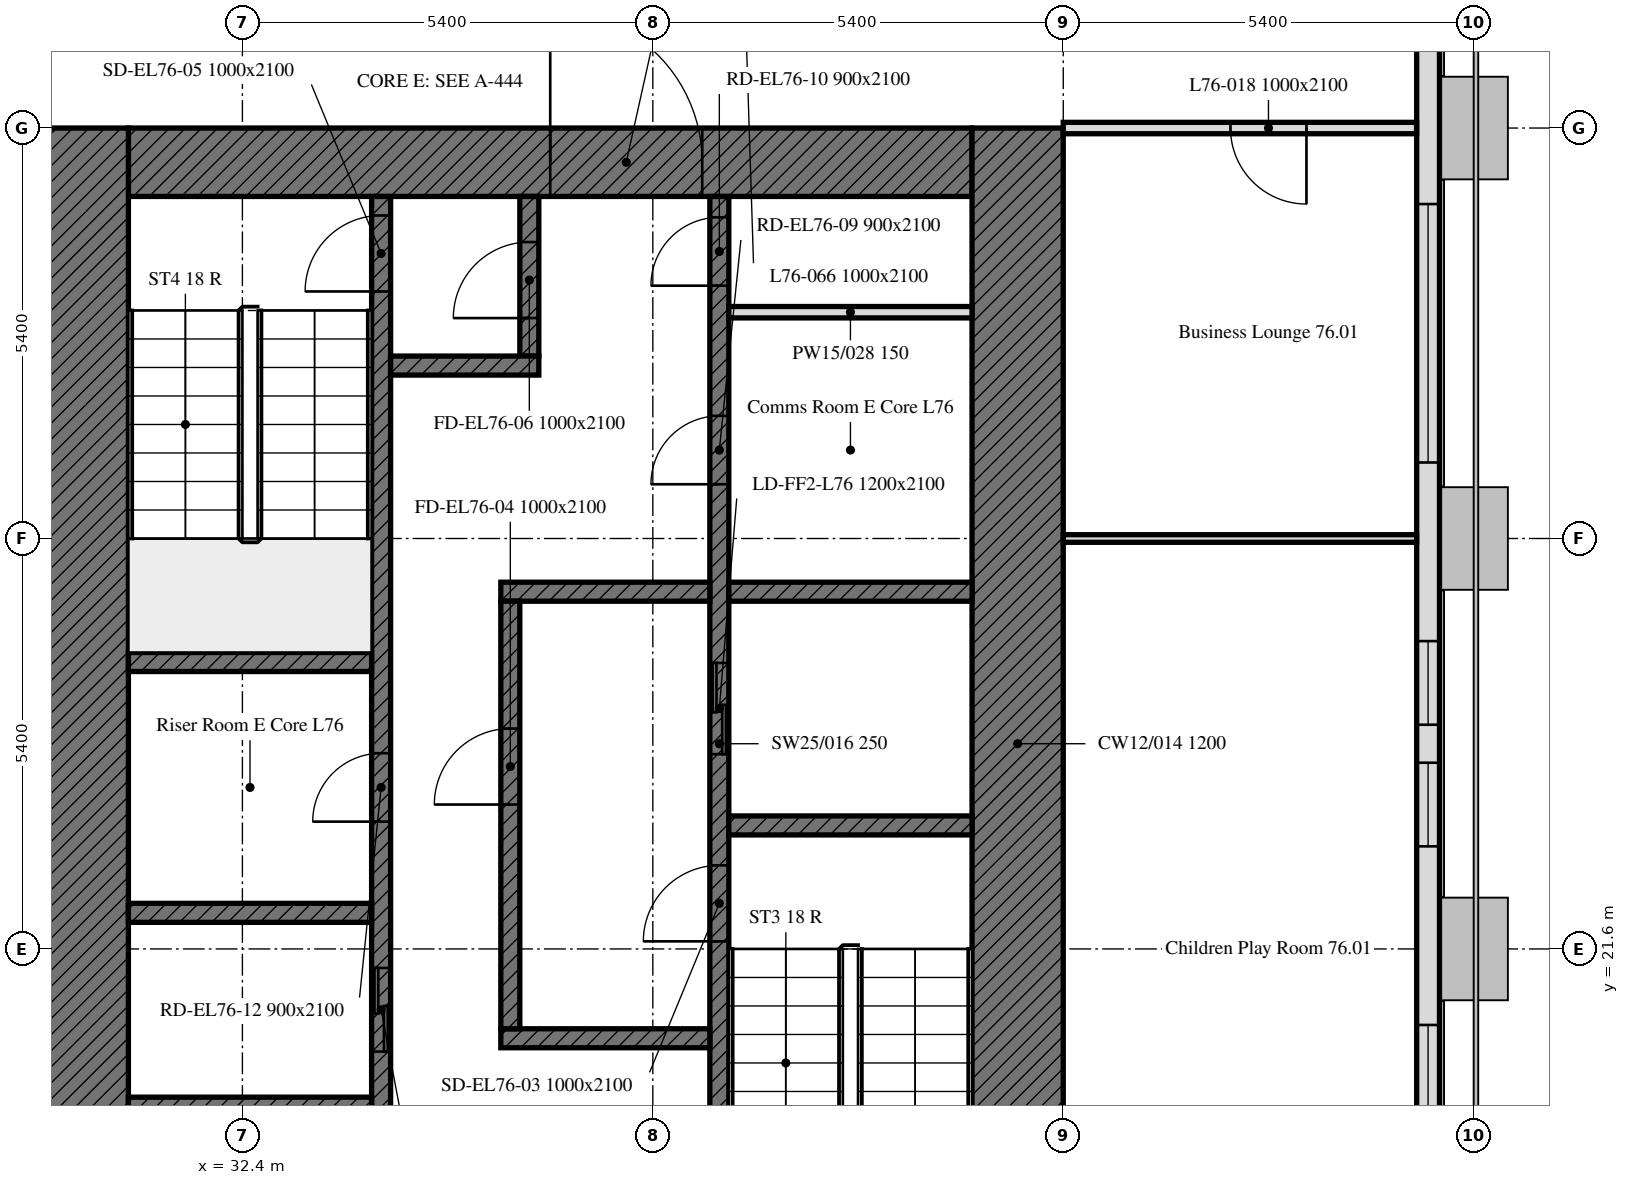
"""IFC4 building model, lengths in metres.
Left out: names, types, materials, properties, quantities, classifications, styles, units other than length and angle.
Written with IfcOpenShell. Run it as: python <this file> out.ifc"""

import sys

from ifc_helpers import new_model, si_unit, direction, frame, frame_2d, origin, place, context, subcontext, project, spatial, rectangle, extrude, element, fill, save


model = new_model("IFC4")
c1 = context("Model", 3, precision=1e-05, world=origin(), true_north=direction((0.0, 1.0)))
c2 = subcontext(c1, "Body", "Model", "MODEL_VIEW")
j1 = project(units=[si_unit("LENGTHUNIT", "METRE"), si_unit("PLANEANGLEUNIT", "RADIAN")], contexts=[c1])
p1 = place(None, origin())
s1 = spatial("IfcSite", under=j1, at=p1, CompositionType="ELEMENT")
p2 = place(p1, origin())
s2 = spatial("IfcBuilding", under=s1, at=p2, CompositionType="ELEMENT")
p3 = place(p2, frame((0.0, 0.0, 304.9)))
s3 = spatial("IfcBuildingStorey", under=s2, at=p3, CompositionType="ELEMENT", Elevation=304.9)
p4 = place(p3, frame((48.0, 10.986, 0.0), z_axis=(0.0, 0.0, 1.0), x_axis=(0.0, 1.0, 0.0)))
e1 = element("IfcWall", 1, at=p4, inside=s3, PredefinedType="SOLIDWALL", context=c2, shape_type="SweptSolid", body=[
    extrude(rectangle(XDim=32.027, YDim=0.3, at=frame_2d((16.014, 0.0))), origin(), (0.0, 0.0, 1.0), 2.8),
])
p5 = place(p4, frame((1.314, 0.0, 0.9)))
e2 = element("IfcOpeningElement", 2, at=p5, cuts=e1, PredefinedType="OPENING", context=c2, shape_type="SweptSolid", body=[
    extrude(rectangle(XDim=1.1, YDim=1.7, at=frame_2d((0.55, 0.85))), frame((0.0, 0.16, 0.0), z_axis=(0.0, -1.0, 0.0), x_axis=(1.0, 0.0, 0.0)), (0.0, 0.0, 1.0), 0.32),
])
p6 = place(p4, frame((2.589, 0.0, 0.9)))
e3 = element("IfcOpeningElement", 3, at=p6, cuts=e1, PredefinedType="OPENING", context=c2, shape_type="SweptSolid", body=[
    extrude(rectangle(XDim=0.65, YDim=1.7, at=frame_2d((0.325, 0.85))), frame((0.0, 0.16, 0.0), z_axis=(0.0, -1.0, 0.0), x_axis=(1.0, 0.0, 0.0)), (0.0, 0.0, 1.0), 0.32),
])
p7 = place(p4, frame((6.214, 0.0, 0.9)))
e4 = element("IfcOpeningElement", 4, at=p7, cuts=e1, PredefinedType="OPENING", context=c2, shape_type="SweptSolid", body=[
    extrude(rectangle(XDim=3.4, YDim=1.7, at=frame_2d((1.7, 0.85))), frame((0.0, 0.16, 0.0), z_axis=(0.0, -1.0, 0.0), x_axis=(1.0, 0.0, 0.0)), (0.0, 0.0, 1.0), 0.32),
])
p8 = place(p4, frame((11.964, 0.0, 0.9)))
e5 = element("IfcOpeningElement", 5, at=p8, cuts=e1, PredefinedType="OPENING", context=c2, shape_type="SweptSolid", body=[
    extrude(rectangle(XDim=1.1, YDim=1.7, at=frame_2d((0.55, 0.85))), frame((0.0, 0.16, 0.0), z_axis=(0.0, -1.0, 0.0), x_axis=(1.0, 0.0, 0.0)), (0.0, 0.0, 1.0), 0.32),
])
p9 = place(p4, frame((13.564, 0.0, 0.9)))
e6 = element("IfcOpeningElement", 6, at=p9, cuts=e1, PredefinedType="OPENING", context=c2, shape_type="SweptSolid", body=[
    extrude(rectangle(XDim=1.1, YDim=1.7, at=frame_2d((0.55, 0.85))), frame((0.0, 0.16, 0.0), z_axis=(0.0, -1.0, 0.0), x_axis=(1.0, 0.0, 0.0)), (0.0, 0.0, 1.0), 0.32),
])
p10 = place(p4, frame((17.014, 0.0, 0.9)))
e7 = element("IfcOpeningElement", 7, at=p10, cuts=e1, PredefinedType="OPENING", context=c2, shape_type="SweptSolid", body=[
    extrude(rectangle(XDim=3.4, YDim=1.7, at=frame_2d((1.7, 0.85))), frame((0.0, 0.16, 0.0), z_axis=(0.0, -1.0, 0.0), x_axis=(1.0, 0.0, 0.0)), (0.0, 0.0, 1.0), 0.32),
])
p11 = place(p4, frame((23.389, 0.0, 0.9)))
e8 = element("IfcOpeningElement", 8, at=p11, cuts=e1, PredefinedType="OPENING", context=c2, shape_type="SweptSolid", body=[
    extrude(rectangle(XDim=0.65, YDim=1.7, at=frame_2d((0.325, 0.85))), frame((0.0, 0.16, 0.0), z_axis=(0.0, -1.0, 0.0), x_axis=(1.0, 0.0, 0.0)), (0.0, 0.0, 1.0), 0.32),
])
p12 = place(p4, frame((24.364, 0.0, 0.9)))
e9 = element("IfcOpeningElement", 9, at=p12, cuts=e1, PredefinedType="OPENING", context=c2, shape_type="SweptSolid", body=[
    extrude(rectangle(XDim=1.1, YDim=1.7, at=frame_2d((0.55, 0.85))), frame((0.0, 0.16, 0.0), z_axis=(0.0, -1.0, 0.0), x_axis=(1.0, 0.0, 0.0)), (0.0, 0.0, 1.0), 0.32),
])
p13 = place(p4, frame((28.164, 0.0, 0.9)))
e10 = element("IfcOpeningElement", 10, at=p13, cuts=e1, PredefinedType="OPENING", context=c2, shape_type="SweptSolid", body=[
    extrude(rectangle(XDim=1.1, YDim=1.7, at=frame_2d((0.55, 0.85))), frame((0.0, 0.16, 0.0), z_axis=(0.0, -1.0, 0.0), x_axis=(1.0, 0.0, 0.0)), (0.0, 0.0, 1.0), 0.32),
])
p14 = place(p4, frame((29.764, 0.0, 0.9)))
e11 = element("IfcOpeningElement", 11, at=p14, cuts=e1, PredefinedType="OPENING", context=c2, shape_type="SweptSolid", body=[
    extrude(rectangle(XDim=1.1, YDim=1.7, at=frame_2d((0.55, 0.85))), frame((0.0, 0.16, 0.0), z_axis=(0.0, -1.0, 0.0), x_axis=(1.0, 0.0, 0.0)), (0.0, 0.0, 1.0), 0.32),
])
p15 = place(p3, frame((30.9, 31.95, 0.0), z_axis=(0.0, 0.0, 1.0), x_axis=(1.0, 0.0, 0.0)))
e12 = element("IfcWall", 12, at=p15, inside=s3, PredefinedType="SOLIDWALL", context=c2, shape_type="SweptSolid", body=[
    extrude(rectangle(XDim=11.1, YDim=0.9, at=frame_2d((5.55, 0.0))), origin(), (0.0, 0.0, 1.0), 2.8),
])
p16 = place(p15, frame((5.55, 0.0, 0.0)))
e13 = element("IfcOpeningElement", 13, at=p16, cuts=e12, PredefinedType="OPENING", context=c2, shape_type="SweptSolid", body=[
    extrude(rectangle(XDim=2.0, YDim=2.4, at=frame_2d((1.0, 1.2))), frame((0.0, 0.45, 0.0), z_axis=(0.0, -1.0, 0.0), x_axis=(1.0, 0.0, 0.0)), (0.0, 0.0, 1.0), 0.9),
])
for number, where, z_axis, x_axis in (
    (14, (42.6, 32.4, 0.0), (0.0, 0.0, 1.0), (0.0, -1.0, 0.0)),
    (15, (30.3, 16.2, 0.0), (0.0, 0.0, 1.0), (0.0, 1.0, 0.0)),
):
    element("IfcWall", number, at=place(p3, frame(where, z_axis=z_axis, x_axis=x_axis)), inside=s3, PredefinedType="SOLIDWALL", context=c2, shape_type="SweptSolid", body=[
        extrude(rectangle(XDim=16.2, YDim=1.2, at=frame_2d((8.1, 0.0))), origin(), (0.0, 0.0, 1.0), 2.8),
    ])
p17 = place(p3, frame((38.675, 17.1, 0.0), z_axis=(0.0, 0.0, 1.0), x_axis=(0.0, 1.0, 0.0)))
e16 = element("IfcWall", 16, at=p17, inside=s3, PredefinedType="SOLIDWALL", context=c2, shape_type="SweptSolid", body=[
    extrude(rectangle(XDim=14.4, YDim=0.25, at=frame_2d((7.2, 0.0))), origin(), (0.0, 0.0, 1.0), 2.8),
])
p18 = place(p17, frame((4.6, 0.0, 0.0)))
e17 = element("IfcOpeningElement", 17, at=p18, cuts=e16, PredefinedType="OPENING", context=c2, shape_type="SweptSolid", body=[
    extrude(rectangle(XDim=1.0, YDim=2.1, at=frame_2d((0.5, 1.05))), frame((0.0, 0.125, 0.0), z_axis=(0.0, -1.0, 0.0), x_axis=(1.0, 0.0, 0.0)), (0.0, 0.0, 1.0), 0.25),
])
p19 = place(p17, frame((7.062, 0.0, 0.0)))
e18 = element("IfcOpeningElement", 18, at=p19, cuts=e16, PredefinedType="OPENING", context=c2, shape_type="SweptSolid", body=[
    extrude(rectangle(XDim=1.2, YDim=2.1, at=frame_2d((0.6, 1.05))), frame((0.0, 0.125, 0.0), z_axis=(0.0, -1.0, 0.0), x_axis=(1.0, 0.0, 0.0)), (0.0, 0.0, 1.0), 0.25),
])
p20 = place(p17, frame((10.614, 0.0, 0.0)))
e19 = element("IfcOpeningElement", 19, at=p20, cuts=e16, PredefinedType="OPENING", context=c2, shape_type="SweptSolid", body=[
    extrude(rectangle(XDim=0.9, YDim=2.1, at=frame_2d((0.45, 1.05))), frame((0.0, 0.125, 0.0), z_axis=(0.0, -1.0, 0.0), x_axis=(1.0, 0.0, 0.0)), (0.0, 0.0, 1.0), 0.25),
])
p21 = place(p17, frame((13.226, 0.0, 0.0)))
e20 = element("IfcOpeningElement", 20, at=p21, cuts=e16, PredefinedType="OPENING", context=c2, shape_type="SweptSolid", body=[
    extrude(rectangle(XDim=0.9, YDim=2.1, at=frame_2d((0.45, 1.05))), frame((0.0, 0.125, 0.0), z_axis=(0.0, -1.0, 0.0), x_axis=(1.0, 0.0, 0.0)), (0.0, 0.0, 1.0), 0.25),
])
p22 = place(p3, frame((34.225, 17.1, 0.0), z_axis=(0.0, 0.0, 1.0), x_axis=(0.0, 1.0, 0.0)))
e21 = element("IfcWall", 21, at=p22, inside=s3, PredefinedType="SOLIDWALL", context=c2, shape_type="SweptSolid", body=[
    extrude(rectangle(XDim=14.4, YDim=0.25, at=frame_2d((7.2, 0.0))), origin(), (0.0, 0.0, 1.0), 2.8),
])
p23 = place(p22, frame((13.15, 0.0, 0.0)))
e22 = element("IfcOpeningElement", 22, at=p23, cuts=e21, PredefinedType="OPENING", context=c2, shape_type="SweptSolid", body=[
    extrude(rectangle(XDim=1.0, YDim=2.1, at=frame_2d((0.5, 1.05))), frame((0.0, 0.125, 0.0), z_axis=(0.0, -1.0, 0.0), x_axis=(1.0, 0.0, 0.0)), (0.0, 0.0, 1.0), 0.25),
])
p24 = place(p22, frame((3.15, 0.0, 0.0)))
e23 = element("IfcOpeningElement", 23, at=p24, cuts=e21, PredefinedType="OPENING", context=c2, shape_type="SweptSolid", body=[
    extrude(rectangle(XDim=1.1, YDim=2.1, at=frame_2d((0.55, 1.05))), frame((0.0, 0.125, 0.0), z_axis=(0.0, -1.0, 0.0), x_axis=(1.0, 0.0, 0.0)), (0.0, 0.0, 1.0), 0.25),
])
p25 = place(p22, frame((0.7, 0.0, 0.0)))
e24 = element("IfcOpeningElement", 24, at=p25, cuts=e21, PredefinedType="OPENING", context=c2, shape_type="SweptSolid", body=[
    extrude(rectangle(XDim=0.9, YDim=2.1, at=frame_2d((0.45, 1.05))), frame((0.0, 0.125, 0.0), z_axis=(0.0, -1.0, 0.0), x_axis=(1.0, 0.0, 0.0)), (0.0, 0.0, 1.0), 0.25),
])
p26 = place(p22, frame((6.175, 0.0, 0.0)))
e25 = element("IfcOpeningElement", 25, at=p26, cuts=e21, PredefinedType="OPENING", context=c2, shape_type="SweptSolid", body=[
    extrude(rectangle(XDim=0.9, YDim=2.1, at=frame_2d((0.45, 1.05))), frame((0.0, 0.125, 0.0), z_axis=(0.0, -1.0, 0.0), x_axis=(1.0, 0.0, 0.0)), (0.0, 0.0, 1.0), 0.25),
])
p27 = place(p3, frame((38.8, 23.225, 0.0), z_axis=(0.0, 0.0, 1.0), x_axis=(1.0, 0.0, 0.0)))
e26 = element("IfcWall", 26, at=p27, inside=s3, PredefinedType="SOLIDWALL", context=c2, shape_type="SweptSolid", body=[
    extrude(rectangle(XDim=3.2, YDim=0.25, at=frame_2d((1.6, 0.0))), origin(), (0.0, 0.0, 1.0), 2.8),
])
for number, where, z_axis, x_axis in (
    (27, (30.9, 25.375, 0.0), (0.0, 0.0, 1.0), (1.0, 0.0, 0.0)),
    (28, (30.9, 22.075, 0.0), (0.0, 0.0, 1.0), (1.0, 0.0, 0.0)),
):
    element("IfcWall", number, at=place(p3, frame(where, z_axis=z_axis, x_axis=x_axis)), inside=s3, PredefinedType="SOLIDWALL", context=c2, shape_type="SweptSolid", body=[
        extrude(rectangle(XDim=3.2, YDim=0.25, at=frame_2d((1.6, 0.0))), origin(), (0.0, 0.0, 1.0), 2.8),
    ])
p28 = place(p3, frame((38.8, 26.3, 0.0), z_axis=(0.0, 0.0, 1.0), x_axis=(1.0, 0.0, 0.0)))
e29 = element("IfcWall", 29, at=p28, inside=s3, PredefinedType="SOLIDWALL", context=c2, shape_type="SweptSolid", body=[
    extrude(rectangle(XDim=3.2, YDim=0.25, at=frame_2d((1.6, 0.0))), origin(), (0.0, 0.0, 1.0), 2.8),
])
for number, where, z_axis, x_axis in (
    (30, (35.8, 26.3, 0.0), (0.0, 0.0, 1.0), (1.0, 0.0, 0.0)),
    (31, (35.8, 20.425, 0.0), (0.0, 0.0, 1.0), (1.0, 0.0, 0.0)),
):
    element("IfcWall", number, at=place(p3, frame(where, z_axis=z_axis, x_axis=x_axis)), inside=s3, PredefinedType="SOLIDWALL", context=c2, shape_type="SweptSolid", body=[
        extrude(rectangle(XDim=2.75, YDim=0.25, at=frame_2d((1.375, 0.0))), origin(), (0.0, 0.0, 1.0), 2.8),
    ])
p29 = place(p3, frame((36.175, 29.4, 0.0), z_axis=(0.0, 0.0, 1.0), x_axis=(0.0, 1.0, 0.0)))
e32 = element("IfcWall", 32, at=p29, inside=s3, PredefinedType="SOLIDWALL", context=c2, shape_type="SweptSolid", body=[
    extrude(rectangle(XDim=2.1, YDim=0.25, at=frame_2d((1.05, 0.0))), origin(), (0.0, 0.0, 1.0), 2.8),
])
p30 = place(p29, frame((0.5, 0.0, 0.0)))
e33 = element("IfcOpeningElement", 33, at=p30, cuts=e32, PredefinedType="OPENING", context=c2, shape_type="SweptSolid", body=[
    extrude(rectangle(XDim=1.0, YDim=2.1, at=frame_2d((0.5, 1.05))), frame((0.0, 0.125, 0.0), z_axis=(0.0, -1.0, 0.0), x_axis=(1.0, 0.0, 0.0)), (0.0, 0.0, 1.0), 0.25),
])
p31 = place(p3, frame((34.35, 29.275, 0.0), z_axis=(0.0, 0.0, 1.0), x_axis=(1.0, 0.0, 0.0)))
e34 = element("IfcWall", 34, at=p31, inside=s3, PredefinedType="SOLIDWALL", context=c2, shape_type="SweptSolid", body=[
    extrude(rectangle(XDim=1.95, YDim=0.25, at=frame_2d((0.975, 0.0))), origin(), (0.0, 0.0, 1.0), 2.8),
])
p32 = place(p3, frame((35.925, 20.55, 0.0), z_axis=(0.0, 0.0, 1.0), x_axis=(0.0, 1.0, 0.0)))
e35 = element("IfcWall", 35, at=p32, inside=s3, PredefinedType="SOLIDWALL", context=c2, shape_type="SweptSolid", body=[
    extrude(rectangle(XDim=5.625, YDim=0.25, at=frame_2d((2.812, 0.0))), origin(), (0.0, 0.0, 1.0), 2.8),
])
p33 = place(p32, frame((2.95, 0.0, 0.0)))
e36 = element("IfcOpeningElement", 36, at=p33, cuts=e35, PredefinedType="OPENING", context=c2, shape_type="SweptSolid", body=[
    extrude(rectangle(XDim=1.0, YDim=2.1, at=frame_2d((0.5, 1.05))), frame((0.0, 0.125, 0.0), z_axis=(0.0, -1.0, 0.0), x_axis=(1.0, 0.0, 0.0)), (0.0, 0.0, 1.0), 0.25),
])
p34 = place(p3, frame((30.9, 19.525, 0.0), z_axis=(0.0, 0.0, 1.0), x_axis=(1.0, 0.0, 0.0)))
e37 = element("IfcWall", 37, at=p34, inside=s3, PredefinedType="SOLIDWALL", context=c2, shape_type="SweptSolid", body=[
    extrude(rectangle(XDim=3.2, YDim=0.25, at=frame_2d((1.6, 0.0))), origin(), (0.0, 0.0, 1.0), 2.8),
])
p35 = place(p3, frame((38.8, 29.977, 0.0), z_axis=(0.0, 0.0, 1.0), x_axis=(1.0, 0.0, 0.0)))
e38 = element("IfcWall", 38, at=p35, inside=s3, PredefinedType="PARTITIONING", context=c2, shape_type="SweptSolid", body=[
    extrude(rectangle(XDim=3.2, YDim=0.15, at=frame_2d((1.6, 0.0))), origin(), (0.0, 0.0, 1.0), 2.8),
])
p36 = place(p3, frame((47.849, 32.4, 0.0), z_axis=(0.0, 0.0, 1.0), x_axis=(-1.0, 0.0, 0.0)))
e39 = element("IfcWall", 39, at=p36, inside=s3, PredefinedType="PARTITIONING", context=c2, shape_type="SweptSolid", body=[
    extrude(rectangle(XDim=4.649, YDim=0.15, at=frame_2d((2.325, 0.0))), origin(), (0.0, 0.0, 1.0), 2.2),
])
p37 = place(p36, frame((1.449, 0.0, 0.0)))
e40 = element("IfcOpeningElement", 40, at=p37, cuts=e39, PredefinedType="OPENING", context=c2, shape_type="SweptSolid", body=[
    extrude(rectangle(XDim=1.0, YDim=2.1, at=frame_2d((0.5, 1.05))), frame((0.0, 0.075, 0.0), z_axis=(0.0, -1.0, 0.0), x_axis=(1.0, 0.0, 0.0)), (0.0, 0.0, 1.0), 0.15),
])
p38 = place(p3, frame((43.2, 27.0, 0.0), z_axis=(0.0, 0.0, 1.0), x_axis=(1.0, 0.0, 0.0)))
e41 = element("IfcWall", 41, at=p38, inside=s3, PredefinedType="PARTITIONING", context=c2, shape_type="SweptSolid", body=[
    extrude(rectangle(XDim=4.649, YDim=0.1, at=frame_2d((2.325, 0.0))), origin(), (0.0, 0.0, 1.0), 2.2),
])
p39 = place(p7, origin())
e42 = element("IfcWindow", 42, at=p39, inside=s3, PartitioningType="SINGLE_PANEL", PredefinedType="WINDOW", context=c2, shape_type="SweptSolid", body=[
    extrude(rectangle(XDim=3.4, YDim=1.7, at=frame_2d((1.7, 0.85))), frame((0.0, 0.03, 0.0), z_axis=(0.0, -1.0, 0.0), x_axis=(1.0, 0.0, 0.0)), (0.0, 0.0, 1.0), 0.06),
])
fill(e4, e42)
p40 = place(p8, origin())
e43 = element("IfcWindow", 43, at=p40, inside=s3, PartitioningType="SINGLE_PANEL", PredefinedType="WINDOW", context=c2, shape_type="SweptSolid", body=[
    extrude(rectangle(XDim=1.1, YDim=1.7, at=frame_2d((0.55, 0.85))), frame((0.0, 0.03, 0.0), z_axis=(0.0, -1.0, 0.0), x_axis=(1.0, 0.0, 0.0)), (0.0, 0.0, 1.0), 0.06),
])
fill(e5, e43)
p41 = place(p9, origin())
e44 = element("IfcWindow", 44, at=p41, inside=s3, PartitioningType="SINGLE_PANEL", PredefinedType="WINDOW", context=c2, shape_type="SweptSolid", body=[
    extrude(rectangle(XDim=1.1, YDim=1.7, at=frame_2d((0.55, 0.85))), frame((0.0, 0.03, 0.0), z_axis=(0.0, -1.0, 0.0), x_axis=(1.0, 0.0, 0.0)), (0.0, 0.0, 1.0), 0.06),
])
fill(e6, e44)
p42 = place(p10, origin())
e45 = element("IfcWindow", 45, at=p42, inside=s3, PartitioningType="SINGLE_PANEL", PredefinedType="WINDOW", context=c2, shape_type="SweptSolid", body=[
    extrude(rectangle(XDim=3.4, YDim=1.7, at=frame_2d((1.7, 0.85))), frame((0.0, 0.03, 0.0), z_axis=(0.0, -1.0, 0.0), x_axis=(1.0, 0.0, 0.0)), (0.0, 0.0, 1.0), 0.06),
])
fill(e7, e45)
p43 = place(p16, origin())
e46 = element("IfcDoor", 46, at=p43, inside=s3, OperationType="DOUBLE_DOOR_SINGLE_SWING", PredefinedType="DOOR", context=c2, shape_type="SweptSolid", body=[
    extrude(rectangle(XDim=2.0, YDim=2.4, at=frame_2d((1.0, 1.2))), frame((0.0, 0.025, 0.0), z_axis=(0.0, -1.0, 0.0), x_axis=(1.0, 0.0, 0.0)), (0.0, 0.0, 1.0), 0.05),
])
fill(e13, e46)
p44 = place(p18, origin())
e47 = element("IfcDoor", 47, at=p44, inside=s3, OperationType="SINGLE_SWING_LEFT", PredefinedType="DOOR", context=c2, shape_type="SweptSolid", body=[
    extrude(rectangle(XDim=1.0, YDim=2.1, at=frame_2d((0.5, 1.05))), frame((0.0, 0.025, 0.0), z_axis=(0.0, -1.0, 0.0), x_axis=(1.0, 0.0, 0.0)), (0.0, 0.0, 1.0), 0.05),
])
fill(e17, e47)
p45 = place(p33, origin())
e48 = element("IfcDoor", 48, at=p45, inside=s3, OperationType="SINGLE_SWING_LEFT", PredefinedType="DOOR", context=c2, shape_type="SweptSolid", body=[
    extrude(rectangle(XDim=1.0, YDim=2.1, at=frame_2d((0.5, 1.05))), frame((0.0, 0.025, 0.0), z_axis=(0.0, -1.0, 0.0), x_axis=(1.0, 0.0, 0.0)), (0.0, 0.0, 1.0), 0.05),
])
fill(e36, e48)
p46 = place(p23, origin())
e49 = element("IfcDoor", 49, at=p46, inside=s3, OperationType="SINGLE_SWING_LEFT", PredefinedType="DOOR", context=c2, shape_type="SweptSolid", body=[
    extrude(rectangle(XDim=1.0, YDim=2.1, at=frame_2d((0.5, 1.05))), frame((0.0, 0.025, 0.0), z_axis=(0.0, -1.0, 0.0), x_axis=(1.0, 0.0, 0.0)), (0.0, 0.0, 1.0), 0.05),
])
fill(e22, e49)
p47 = place(p30, origin())
e50 = element("IfcDoor", 50, at=p47, inside=s3, OperationType="SINGLE_SWING_LEFT", PredefinedType="DOOR", context=c2, shape_type="SweptSolid", body=[
    extrude(rectangle(XDim=1.0, YDim=2.1, at=frame_2d((0.5, 1.05))), frame((0.0, 0.025, 0.0), z_axis=(0.0, -1.0, 0.0), x_axis=(1.0, 0.0, 0.0)), (0.0, 0.0, 1.0), 0.05),
])
fill(e33, e50)
p48 = place(p19, origin())
e51 = element("IfcDoor", 51, at=p48, inside=s3, OperationType="DOUBLE_DOOR_SLIDING", PredefinedType="DOOR", context=c2, shape_type="SweptSolid", body=[
    extrude(rectangle(XDim=1.2, YDim=2.1, at=frame_2d((0.6, 1.05))), frame((0.0, 0.025, 0.0), z_axis=(0.0, -1.0, 0.0), x_axis=(1.0, 0.0, 0.0)), (0.0, 0.0, 1.0), 0.05),
])
fill(e18, e51)
p49 = place(p24, origin())
e52 = element("IfcDoor", 52, at=p49, inside=s3, OperationType="DOUBLE_DOOR_SLIDING", PredefinedType="DOOR", context=c2, shape_type="SweptSolid", body=[
    extrude(rectangle(XDim=1.1, YDim=2.1, at=frame_2d((0.55, 1.05))), frame((0.0, 0.025, 0.0), z_axis=(0.0, -1.0, 0.0), x_axis=(1.0, 0.0, 0.0)), (0.0, 0.0, 1.0), 0.05),
])
fill(e23, e52)
p50 = place(p20, origin())
e53 = element("IfcDoor", 53, at=p50, inside=s3, OperationType="SINGLE_SWING_LEFT", PredefinedType="DOOR", context=c2, shape_type="SweptSolid", body=[
    extrude(rectangle(XDim=0.9, YDim=2.1, at=frame_2d((0.45, 1.05))), frame((0.0, 0.025, 0.0), z_axis=(0.0, -1.0, 0.0), x_axis=(1.0, 0.0, 0.0)), (0.0, 0.0, 1.0), 0.05),
])
fill(e19, e53)
p51 = place(p21, origin())
e54 = element("IfcDoor", 54, at=p51, inside=s3, OperationType="SINGLE_SWING_LEFT", PredefinedType="DOOR", context=c2, shape_type="SweptSolid", body=[
    extrude(rectangle(XDim=0.9, YDim=2.1, at=frame_2d((0.45, 1.05))), frame((0.0, 0.025, 0.0), z_axis=(0.0, -1.0, 0.0), x_axis=(1.0, 0.0, 0.0)), (0.0, 0.0, 1.0), 0.05),
])
fill(e20, e54)
p52 = place(p26, origin())
e55 = element("IfcDoor", 55, at=p52, inside=s3, OperationType="SINGLE_SWING_LEFT", PredefinedType="DOOR", context=c2, shape_type="SweptSolid", body=[
    extrude(rectangle(XDim=0.9, YDim=2.1, at=frame_2d((0.45, 1.05))), frame((0.0, 0.025, 0.0), z_axis=(0.0, -1.0, 0.0), x_axis=(1.0, 0.0, 0.0)), (0.0, 0.0, 1.0), 0.05),
])
fill(e25, e55)
p53 = place(p37, origin())
e56 = element("IfcDoor", 56, at=p53, inside=s3, OperationType="SINGLE_SWING_LEFT", PredefinedType="DOOR", context=c2, shape_type="SweptSolid", body=[
    extrude(rectangle(XDim=1.0, YDim=2.1, at=frame_2d((0.5, 1.05))), frame((0.0, 0.025, 0.0), z_axis=(0.0, -1.0, 0.0), x_axis=(1.0, 0.0, 0.0)), (0.0, 0.0, 1.0), 0.05),
])
fill(e40, e56)
save(model, sys.argv[1])
